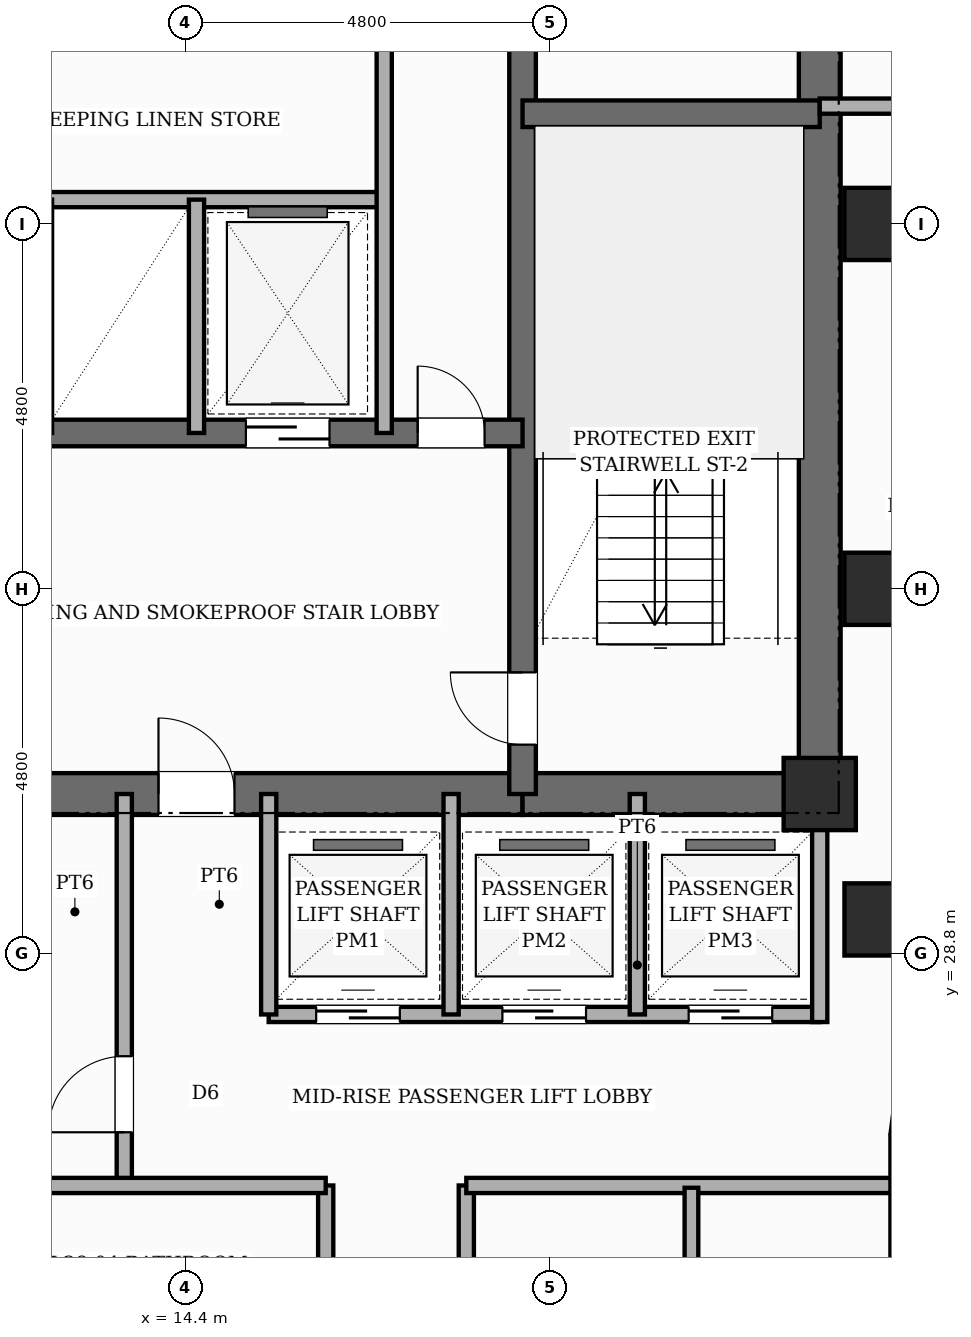
"""IFC4 building model, lengths in metres.
Left out: names, types, materials, properties, quantities, classifications, styles, units other than length and angle.
Written with IfcOpenShell. Run it as: python <this file> out.ifc"""

import sys

from ifc_helpers import new_model, si_unit, direction, frame, frame_2d, origin, origin_2d, place, context, subcontext, project, spatial, rectangle, extrude, element, fill, save


model = new_model("IFC4")
c1 = context("Model", 3, precision=1e-05, world=origin(), true_north=direction((0.0, 1.0)))
c2 = subcontext(c1, "Body", "Model", "MODEL_VIEW")
j1 = project(units=[si_unit("LENGTHUNIT", "METRE"), si_unit("PLANEANGLEUNIT", "RADIAN")], contexts=[c1])
p1 = place(None, origin())
s1 = spatial("IfcSite", under=j1, at=p1, CompositionType="ELEMENT")
p2 = place(p1, origin())
s2 = spatial("IfcBuilding", under=s1, at=p2, CompositionType="ELEMENT")
p3 = place(p2, frame((0.0, 0.0, 110.8)))
s3 = spatial("IfcBuildingStorey", under=s2, at=p3, CompositionType="ELEMENT", Elevation=110.8)
p4 = place(p3, frame((22.75, 30.625, 0.0), z_axis=(0.0, 0.0, 1.0), x_axis=(0.0, 1.0, 0.0)))
e1 = element("IfcWall", 1, at=p4, inside=s3, PredefinedType="SHEAR", context=c2, shape_type="SweptSolid", body=[
    extrude(rectangle(XDim=15.45, YDim=0.55, at=frame_2d((7.725, 0.0))), origin(), (0.0, 0.0, 1.0), 3.6),
])
p5 = place(p4, frame((10.725, 0.0, 0.0)))
e2 = element("IfcOpeningElement", 2, at=p5, cuts=e1, PredefinedType="OPENING", context=c2, shape_type="SweptSolid", body=[
    extrude(rectangle(XDim=1.0, YDim=2.15, at=frame_2d((0.5, 1.075))), frame((0.0, 0.285, 0.0), z_axis=(0.0, -1.0, 0.0), x_axis=(1.0, 0.0, 0.0)), (0.0, 0.0, 1.0), 0.57),
])
p6 = place(p3, frame((9.96, 30.9, 0.0), z_axis=(0.0, 0.0, 1.0), x_axis=(1.0, 0.0, 0.0)))
e3 = element("IfcWall", 3, at=p6, inside=s3, PredefinedType="SHEAR", context=c2, shape_type="SweptSolid", body=[
    extrude(rectangle(XDim=8.88, YDim=0.55, at=frame_2d((4.44, 0.0))), origin(), (0.0, 0.0, 1.0), 3.6),
])
p7 = place(p6, frame((4.09, 0.0, 0.0)))
e4 = element("IfcOpeningElement", 4, at=p7, cuts=e3, PredefinedType="OPENING", context=c2, shape_type="SweptSolid", body=[
    extrude(rectangle(XDim=1.0, YDim=2.15, at=frame_2d((0.5, 1.075))), frame((0.0, 0.285, 0.0), z_axis=(0.0, -1.0, 0.0), x_axis=(1.0, 0.0, 0.0)), (0.0, 0.0, 1.0), 0.57),
])
p8 = place(p3, frame((18.84, 30.9, 0.0), z_axis=(0.0, 0.0, 1.0), x_axis=(1.0, 0.0, 0.0)))
e5 = element("IfcWall", 5, at=p8, inside=s3, PredefinedType="SHEAR", context=c2, shape_type="SweptSolid", body=[
    extrude(rectangle(XDim=3.91, YDim=0.55, at=frame_2d((1.955, 0.0))), origin(), (0.0, 0.0, 1.0), 3.6),
])
p9 = place(p3, frame((18.84, 30.9, 0.0), z_axis=(0.0, 0.0, 1.0), x_axis=(0.0, 1.0, 0.0)))
e6 = element("IfcWall", 6, at=p9, inside=s3, PredefinedType="SHEAR", context=c2, shape_type="SweptSolid", body=[
    extrude(rectangle(XDim=14.9, YDim=0.35, at=frame_2d((7.45, 0.0))), origin(), (0.0, 0.0, 1.0), 3.6),
])
p10 = place(p9, frame((0.65, 0.0, 0.0)))
e7 = element("IfcOpeningElement", 7, at=p10, cuts=e6, PredefinedType="OPENING", context=c2, shape_type="SweptSolid", body=[
    extrude(rectangle(XDim=0.95, YDim=2.1, at=frame_2d((0.475, 1.05))), frame((0.0, 0.185, 0.0), z_axis=(0.0, -1.0, 0.0), x_axis=(1.0, 0.0, 0.0)), (0.0, 0.0, 1.0), 0.37),
])
p11 = place(p9, frame((10.45, 0.0, 0.0)))
e8 = element("IfcOpeningElement", 8, at=p11, cuts=e6, PredefinedType="OPENING", context=c2, shape_type="SweptSolid", body=[
    extrude(rectangle(XDim=1.0, YDim=2.15, at=frame_2d((0.5, 1.075))), frame((0.0, 0.185, 0.0), z_axis=(0.0, -1.0, 0.0), x_axis=(1.0, 0.0, 0.0)), (0.0, 0.0, 1.0), 0.37),
])
p12 = place(p3, frame((18.84, 39.85, 0.0), z_axis=(0.0, 0.0, 1.0), x_axis=(1.0, 0.0, 0.0)))
e9 = element("IfcWall", 9, at=p12, inside=s3, PredefinedType="SHEAR", context=c2, shape_type="SweptSolid", body=[
    extrude(rectangle(XDim=3.91, YDim=0.35, at=frame_2d((1.955, 0.0))), origin(), (0.0, 0.0, 1.0), 3.6),
])
p13 = place(p3, frame((9.96, 35.65, 0.0), z_axis=(0.0, 0.0, 1.0), x_axis=(1.0, 0.0, 0.0)))
e10 = element("IfcWall", 10, at=p13, inside=s3, PredefinedType="SHEAR", context=c2, shape_type="SweptSolid", body=[
    extrude(rectangle(XDim=8.88, YDim=0.35, at=frame_2d((4.44, 0.0))), origin(), (0.0, 0.0, 1.0), 3.6),
])
p14 = place(p13, frame((0.84, 0.0, 0.0)))
e11 = element("IfcOpeningElement", 11, at=p14, cuts=e10, PredefinedType="OPENING", context=c2, shape_type="SweptSolid", body=[
    extrude(rectangle(XDim=1.1, YDim=2.15, at=frame_2d((0.55, 1.075))), frame((0.0, 0.185, 0.0), z_axis=(0.0, -1.0, 0.0), x_axis=(1.0, 0.0, 0.0)), (0.0, 0.0, 1.0), 0.37),
])
p15 = place(p13, frame((5.24, 0.0, 0.0)))
e12 = element("IfcOpeningElement", 12, at=p15, cuts=e10, PredefinedType="OPENING", context=c2, shape_type="SweptSolid", body=[
    extrude(rectangle(XDim=1.1, YDim=2.15, at=frame_2d((0.55, 1.075))), frame((0.0, 0.185, 0.0), z_axis=(0.0, -1.0, 0.0), x_axis=(1.0, 0.0, 0.0)), (0.0, 0.0, 1.0), 0.37),
])
p16 = place(p13, frame((7.5, 0.0, 0.0)))
e13 = element("IfcOpeningElement", 13, at=p16, cuts=e10, PredefinedType="OPENING", context=c2, shape_type="SweptSolid", body=[
    extrude(rectangle(XDim=0.88, YDim=2.1, at=frame_2d((0.44, 1.05))), frame((0.0, 0.185, 0.0), z_axis=(0.0, -1.0, 0.0), x_axis=(1.0, 0.0, 0.0)), (0.0, 0.0, 1.0), 0.37),
])
for number, where, z_axis, x_axis in (
    (14, (22.75, 30.9, 0.0), (0.0, 0.0, 1.0), (1.0, 0.0, 0.0)),
    (15, (23.55, 29.25, 0.0), (0.0, 0.0, 1.0), (1.0, 0.0, 0.0)),
    (16, (23.55, 33.6, 0.0), (0.0, 0.0, 1.0), (1.0, 0.0, 0.0)),
    (17, (23.55, 38.4, 0.0), (0.0, 0.0, 1.0), (1.0, 0.0, 0.0)),
):
    element("IfcColumn", number, at=place(p3, frame(where, z_axis=z_axis, x_axis=x_axis)), inside=s3, PredefinedType="COLUMN", context=c2, shape_type="SweptSolid", body=[
        extrude(rectangle(XDim=0.95, YDim=0.95, at=origin_2d()), origin(), (0.0, 0.0, 1.0), 3.6),
    ])
p17 = place(p3, frame((23.923, 27.042, 0.0), z_axis=(0.0, 0.0, 1.0), x_axis=(-0.130555323746, -0.9914410257, 0.0)))
e18 = element("IfcWall", 18, at=p17, inside=s3, PredefinedType="STANDARD", context=c2, shape_type="SweptSolid", body=[
    extrude(rectangle(XDim=0.626, YDim=0.32, at=frame_2d((0.313, 0.0))), origin(), (0.0, 0.0, 1.0), 2.54),
])
p18 = place(p3, frame((23.84, 26.4, 0.0), z_axis=(0.0, 0.0, 1.0), x_axis=(0.0, -1.0, 0.0)))
e19 = element("IfcWall", 19, at=p18, inside=s3, PredefinedType="STANDARD", context=c2, shape_type="SweptSolid", body=[
    extrude(rectangle(XDim=14.4, YDim=0.32, at=frame_2d((7.2, 0.0))), origin(), (0.0, 0.0, 1.0), 2.54),
])
p19 = place(p18, frame((9.354, 0.0, 0.65)))
e20 = element("IfcOpeningElement", 20, at=p19, cuts=e19, PredefinedType="OPENING", context=c2, shape_type="SweptSolid", body=[
    extrude(rectangle(XDim=1.4, YDim=1.1, at=frame_2d((0.7, 0.55))), frame((0.0, 0.17, 0.0), z_axis=(0.0, -1.0, 0.0), x_axis=(1.0, 0.0, 0.0)), (0.0, 0.0, 1.0), 0.34),
])
p20 = place(p18, frame((3.954, 0.0, 0.65)))
e21 = element("IfcOpeningElement", 21, at=p20, cuts=e19, PredefinedType="OPENING", context=c2, shape_type="SweptSolid", body=[
    extrude(rectangle(XDim=1.4, YDim=1.1, at=frame_2d((0.7, 0.55))), frame((0.0, 0.17, 0.0), z_axis=(0.0, -1.0, 0.0), x_axis=(1.0, 0.0, 0.0)), (0.0, 0.0, 1.0), 0.34),
])
p21 = place(p18, frame((12.707, 0.0, 0.45)))
e22 = element("IfcOpeningElement", 22, at=p21, cuts=e19, PredefinedType="OPENING", context=c2, shape_type="SweptSolid", body=[
    extrude(rectangle(XDim=0.95, YDim=1.8, at=frame_2d((0.475, 0.9))), frame((0.0, 0.17, 0.0), z_axis=(0.0, -1.0, 0.0), x_axis=(1.0, 0.0, 0.0)), (0.0, 0.0, 1.0), 0.34),
])
p22 = place(p18, frame((7.902, 0.0, 0.45)))
e23 = element("IfcOpeningElement", 23, at=p22, cuts=e19, PredefinedType="OPENING", context=c2, shape_type="SweptSolid", body=[
    extrude(rectangle(XDim=0.6, YDim=1.8, at=frame_2d((0.3, 0.9))), frame((0.0, 0.17, 0.0), z_axis=(0.0, -1.0, 0.0), x_axis=(1.0, 0.0, 0.0)), (0.0, 0.0, 1.0), 0.34),
])
p23 = place(p18, frame((0.917, 0.0, 0.45)))
e24 = element("IfcOpeningElement", 24, at=p23, cuts=e19, PredefinedType="OPENING", context=c2, shape_type="SweptSolid", body=[
    extrude(rectangle(XDim=0.75, YDim=1.8, at=frame_2d((0.375, 0.9))), frame((0.0, 0.17, 0.0), z_axis=(0.0, -1.0, 0.0), x_axis=(1.0, 0.0, 0.0)), (0.0, 0.0, 1.0), 0.34),
])
p24 = place(p3, frame((9.96, 38.72, 0.0), z_axis=(0.0, 0.0, 1.0), x_axis=(1.0, 0.0, 0.0)))
e25 = element("IfcWall", 25, at=p24, inside=s3, PredefinedType="POLYGONAL", context=c2, shape_type="SweptSolid", body=[
    extrude(rectangle(XDim=7.06, YDim=0.2, at=frame_2d((3.53, 0.0))), origin(), (0.0, 0.0, 1.0), 3.36),
])
p25 = place(p3, frame((14.55, 35.65, 0.0), z_axis=(0.0, 0.0, 1.0), x_axis=(0.0, 1.0, 0.0)))
e26 = element("IfcWall", 26, at=p25, inside=s3, PredefinedType="POLYGONAL", context=c2, shape_type="SweptSolid", body=[
    extrude(rectangle(XDim=3.07, YDim=0.2, at=frame_2d((1.535, 0.0))), origin(), (0.0, 0.0, 1.0), 3.36),
])
p26 = place(p3, frame((17.02, 35.65, 0.0), z_axis=(0.0, 0.0, 1.0), x_axis=(0.0, 1.0, 0.0)))
e27 = element("IfcWall", 27, at=p26, inside=s3, PredefinedType="POLYGONAL", context=c2, shape_type="SweptSolid", body=[
    extrude(rectangle(XDim=5.15, YDim=0.2, at=frame_2d((2.575, 0.0))), origin(), (0.0, 0.0, 1.0), 3.36),
])
p27 = place(p3, frame((13.6, 25.75, 0.0), z_axis=(0.0, 0.0, 1.0), x_axis=(0.0, 1.0, 0.0)))
e28 = element("IfcWall", 28, at=p27, inside=s3, PredefinedType="POLYGONAL", context=c2, shape_type="SweptSolid", body=[
    extrude(rectangle(XDim=5.15, YDim=0.2, at=frame_2d((2.575, 0.0))), origin(), (0.0, 0.0, 1.0), 3.36),
])
p28 = place(p27, frame((0.7, 0.0, 0.0)))
e29 = element("IfcOpeningElement", 29, at=p28, cuts=e28, PredefinedType="OPENING", context=c2, shape_type="SweptSolid", body=[
    extrude(rectangle(XDim=1.0, YDim=2.15, at=frame_2d((0.5, 1.075))), frame((0.0, 0.11, 0.0), z_axis=(0.0, -1.0, 0.0), x_axis=(1.0, 0.0, 0.0)), (0.0, 0.0, 1.0), 0.22),
])
p29 = place(p3, frame((15.5, 28.0, 0.0), z_axis=(0.0, 0.0, 1.0), x_axis=(1.0, 0.0, 0.0)))
e30 = element("IfcWall", 30, at=p29, inside=s3, PredefinedType="POLYGONAL", context=c2, shape_type="SweptSolid", body=[
    extrude(rectangle(XDim=7.25, YDim=0.2, at=frame_2d((3.625, 0.0))), origin(), (0.0, 0.0, 1.0), 3.36),
])
p30 = place(p29, frame((0.625, 0.0, 0.0)))
e31 = element("IfcOpeningElement", 31, at=p30, cuts=e30, PredefinedType="OPENING", context=c2, shape_type="SweptSolid", body=[
    extrude(rectangle(XDim=1.1, YDim=2.15, at=frame_2d((0.55, 1.075))), frame((0.0, 0.11, 0.0), z_axis=(0.0, -1.0, 0.0), x_axis=(1.0, 0.0, 0.0)), (0.0, 0.0, 1.0), 0.22),
])
p31 = place(p29, frame((3.075, 0.0, 0.0)))
e32 = element("IfcOpeningElement", 32, at=p31, cuts=e30, PredefinedType="OPENING", context=c2, shape_type="SweptSolid", body=[
    extrude(rectangle(XDim=1.1, YDim=2.15, at=frame_2d((0.55, 1.075))), frame((0.0, 0.11, 0.0), z_axis=(0.0, -1.0, 0.0), x_axis=(1.0, 0.0, 0.0)), (0.0, 0.0, 1.0), 0.22),
])
p32 = place(p29, frame((5.525, 0.0, 0.0)))
e33 = element("IfcOpeningElement", 33, at=p32, cuts=e30, PredefinedType="OPENING", context=c2, shape_type="SweptSolid", body=[
    extrude(rectangle(XDim=1.1, YDim=2.15, at=frame_2d((0.55, 1.075))), frame((0.0, 0.11, 0.0), z_axis=(0.0, -1.0, 0.0), x_axis=(1.0, 0.0, 0.0)), (0.0, 0.0, 1.0), 0.22),
])
p33 = place(p3, frame((15.5, 28.0, 0.0), z_axis=(0.0, 0.0, 1.0), x_axis=(0.0, 1.0, 0.0)))
e34 = element("IfcWall", 34, at=p33, inside=s3, PredefinedType="POLYGONAL", context=c2, shape_type="SweptSolid", body=[
    extrude(rectangle(XDim=2.9, YDim=0.2, at=frame_2d((1.45, 0.0))), origin(), (0.0, 0.0, 1.0), 3.36),
])
p34 = place(p3, frame((22.75, 27.9, 0.0), z_axis=(0.0, 0.0, 1.0), x_axis=(0.0, 1.0, 0.0)))
e35 = element("IfcWall", 35, at=p34, inside=s3, PredefinedType="POLYGONAL", context=c2, shape_type="SweptSolid", body=[
    extrude(rectangle(XDim=3.0, YDim=0.2, at=frame_2d((1.5, 0.0))), origin(), (0.0, 0.0, 1.0), 3.36),
])
for number, where, z_axis, x_axis in (
    (36, (17.9, 28.0, 0.0), (0.0, 0.0, 1.0), (0.0, 1.0, 0.0)),
    (37, (20.35, 28.0, 0.0), (0.0, 0.0, 1.0), (0.0, 1.0, 0.0)),
):
    element("IfcWall", number, at=place(p3, frame(where, z_axis=z_axis, x_axis=x_axis)), inside=s3, PredefinedType="POLYGONAL", context=c2, shape_type="SweptSolid", body=[
        extrude(rectangle(XDim=2.9, YDim=0.2, at=frame_2d((1.45, 0.0))), origin(), (0.0, 0.0, 1.0), 3.36),
    ])
p35 = place(p3, frame((16.25, 9.92, 0.0), z_axis=(0.0, 0.0, 1.0), x_axis=(0.0, 1.0, 0.0)))
e38 = element("IfcWall", 38, at=p35, inside=s3, PredefinedType="PARTITIONING", context=c2, shape_type="SweptSolid", body=[
    extrude(rectangle(XDim=15.83, YDim=0.2, at=frame_2d((7.915, 0.0))), origin(), (0.0, 0.0, 1.0), 3.36),
])
p36 = place(p35, frame((0.835, 0.0, 0.0)))
e39 = element("IfcOpeningElement", 39, at=p36, cuts=e38, PredefinedType="OPENING", context=c2, shape_type="SweptSolid", body=[
    extrude(rectangle(XDim=0.98, YDim=2.18, at=frame_2d((0.49, 1.09))), frame((0.0, 0.11, 0.0), z_axis=(0.0, -1.0, 0.0), x_axis=(1.0, 0.0, 0.0)), (0.0, 0.0, 1.0), 0.22),
])
p37 = place(p35, frame((4.415, 0.0, 0.0)))
e40 = element("IfcOpeningElement", 40, at=p37, cuts=e38, PredefinedType="OPENING", context=c2, shape_type="SweptSolid", body=[
    extrude(rectangle(XDim=0.98, YDim=2.18, at=frame_2d((0.49, 1.09))), frame((0.0, 0.11, 0.0), z_axis=(0.0, -1.0, 0.0), x_axis=(1.0, 0.0, 0.0)), (0.0, 0.0, 1.0), 0.22),
])
p38 = place(p35, frame((8.415, 0.0, 0.0)))
e41 = element("IfcOpeningElement", 41, at=p38, cuts=e38, PredefinedType="OPENING", context=c2, shape_type="SweptSolid", body=[
    extrude(rectangle(XDim=0.98, YDim=2.18, at=frame_2d((0.49, 1.09))), frame((0.0, 0.11, 0.0), z_axis=(0.0, -1.0, 0.0), x_axis=(1.0, 0.0, 0.0)), (0.0, 0.0, 1.0), 0.22),
])
p39 = place(p35, frame((12.28, 0.0, 0.0)))
e42 = element("IfcOpeningElement", 42, at=p39, cuts=e38, PredefinedType="OPENING", context=c2, shape_type="SweptSolid", body=[
    extrude(rectangle(XDim=0.98, YDim=2.18, at=frame_2d((0.49, 1.09))), frame((0.0, 0.11, 0.0), z_axis=(0.0, -1.0, 0.0), x_axis=(1.0, 0.0, 0.0)), (0.0, 0.0, 1.0), 0.22),
])
p40 = place(p3, frame((18.1, 9.92, 0.0), z_axis=(0.0, 0.0, 1.0), x_axis=(0.0, 1.0, 0.0)))
e43 = element("IfcWall", 43, at=p40, inside=s3, PredefinedType="PARTITIONING", context=c2, shape_type="SweptSolid", body=[
    extrude(rectangle(XDim=15.83, YDim=0.2, at=frame_2d((7.915, 0.0))), origin(), (0.0, 0.0, 1.0), 3.36),
])
p41 = place(p40, frame((0.946, 0.0, 0.0)))
e44 = element("IfcOpeningElement", 44, at=p41, cuts=e43, PredefinedType="OPENING", context=c2, shape_type="SweptSolid", body=[
    extrude(rectangle(XDim=0.98, YDim=2.18, at=frame_2d((0.49, 1.09))), frame((0.0, 0.11, 0.0), z_axis=(0.0, -1.0, 0.0), x_axis=(1.0, 0.0, 0.0)), (0.0, 0.0, 1.0), 0.22),
])
p42 = place(p40, frame((5.956, 0.0, 0.0)))
e45 = element("IfcOpeningElement", 45, at=p42, cuts=e43, PredefinedType="OPENING", context=c2, shape_type="SweptSolid", body=[
    extrude(rectangle(XDim=0.98, YDim=2.18, at=frame_2d((0.49, 1.09))), frame((0.0, 0.11, 0.0), z_axis=(0.0, -1.0, 0.0), x_axis=(1.0, 0.0, 0.0)), (0.0, 0.0, 1.0), 0.22),
])
p43 = place(p40, frame((11.356, 0.0, 0.0)))
e46 = element("IfcOpeningElement", 46, at=p43, cuts=e43, PredefinedType="OPENING", context=c2, shape_type="SweptSolid", body=[
    extrude(rectangle(XDim=0.98, YDim=2.18, at=frame_2d((0.49, 1.09))), frame((0.0, 0.11, 0.0), z_axis=(0.0, -1.0, 0.0), x_axis=(1.0, 0.0, 0.0)), (0.0, 0.0, 1.0), 0.22),
])
p44 = place(p3, frame((5.12, 25.75, 0.0), z_axis=(0.0, 0.0, 1.0), x_axis=(1.0, 0.0, 0.0)))
e47 = element("IfcWall", 47, at=p44, inside=s3, PredefinedType="PARTITIONING", context=c2, shape_type="SweptSolid", body=[
    extrude(rectangle(XDim=11.13, YDim=0.2, at=frame_2d((5.565, 0.0))), origin(), (0.0, 0.0, 1.0), 3.36),
])
p45 = place(p3, frame((18.1, 25.75, 0.0), z_axis=(0.0, 0.0, 1.0), x_axis=(1.0, 0.0, 0.0)))
e48 = element("IfcWall", 48, at=p45, inside=s3, PredefinedType="PARTITIONING", context=c2, shape_type="SweptSolid", body=[
    extrude(rectangle(XDim=5.58, YDim=0.2, at=frame_2d((2.79, 0.0))), origin(), (0.0, 0.0, 1.0), 3.36),
])
p46 = place(p3, frame((21.062, 23.092, 0.0), z_axis=(0.0, 0.0, 1.0), x_axis=(0.0, 1.0, 0.0)))
e49 = element("IfcWall", 49, at=p46, inside=s3, PredefinedType="PLUMBINGWALL", context=c2, shape_type="SweptSolid", body=[
    extrude(rectangle(XDim=2.628, YDim=0.18, at=frame_2d((1.314, 0.0))), origin(), (0.0, 0.0, 1.0), 3.36),
])
p47 = place(p3, frame((22.75, 39.95, 0.0), z_axis=(0.0, 0.0, 1.0), x_axis=(1.0, 0.0, 0.0)))
e50 = element("IfcWall", 50, at=p47, inside=s3, PredefinedType="PARTITIONING", context=c2, shape_type="SweptSolid", body=[
    extrude(rectangle(XDim=2.75, YDim=0.2, at=frame_2d((1.375, 0.0))), origin(), (0.0, 0.0, 1.0), 3.36),
])
p48 = place(p10, origin())
e51 = element("IfcDoor", 51, at=p48, inside=s3, OperationType="SINGLE_SWING_RIGHT", PredefinedType="DOOR", context=c2, shape_type="SweptSolid", body=[
    extrude(rectangle(XDim=0.95, YDim=2.1, at=frame_2d((0.475, 1.05))), frame((0.0, 0.025, 0.0), z_axis=(0.0, -1.0, 0.0), x_axis=(1.0, 0.0, 0.0)), (0.0, 0.0, 1.0), 0.05),
])
fill(e7, e51)
p49 = place(p7, origin())
e52 = element("IfcDoor", 52, at=p49, inside=s3, OperationType="SINGLE_SWING_LEFT", PredefinedType="DOOR", context=c2, shape_type="SweptSolid", body=[
    extrude(rectangle(XDim=1.0, YDim=2.15, at=frame_2d((0.5, 1.075))), frame((0.0, 0.025, 0.0), z_axis=(0.0, -1.0, 0.0), x_axis=(1.0, 0.0, 0.0)), (0.0, 0.0, 1.0), 0.05),
])
fill(e4, e52)
p50 = place(p15, origin())
e53 = element("IfcDoor", 53, at=p50, inside=s3, OperationType="SLIDING_TO_RIGHT", PredefinedType="DOOR", context=c2, shape_type="SweptSolid", body=[
    extrude(rectangle(XDim=1.1, YDim=2.15, at=frame_2d((0.55, 1.075))), frame((0.0, 0.025, 0.0), z_axis=(0.0, -1.0, 0.0), x_axis=(1.0, 0.0, 0.0)), (0.0, 0.0, 1.0), 0.05),
])
fill(e12, e53)
p51 = place(p16, origin())
e54 = element("IfcDoor", 54, at=p51, inside=s3, OperationType="SINGLE_SWING_LEFT", PredefinedType="DOOR", context=c2, shape_type="SweptSolid", body=[
    extrude(rectangle(XDim=0.88, YDim=2.1, at=frame_2d((0.44, 1.05))), frame((0.0, 0.025, 0.0), z_axis=(0.0, -1.0, 0.0), x_axis=(1.0, 0.0, 0.0)), (0.0, 0.0, 1.0), 0.05),
])
fill(e13, e54)
p52 = place(p28, origin())
e55 = element("IfcDoor", 55, at=p52, inside=s3, OperationType="SINGLE_SWING_LEFT", PredefinedType="DOOR", context=c2, shape_type="SweptSolid", body=[
    extrude(rectangle(XDim=1.0, YDim=2.15, at=frame_2d((0.5, 1.075))), frame((0.0, 0.025, 0.0), z_axis=(0.0, -1.0, 0.0), x_axis=(1.0, 0.0, 0.0)), (0.0, 0.0, 1.0), 0.05),
])
fill(e29, e55)
p53 = place(p30, origin())
e56 = element("IfcDoor", 56, at=p53, inside=s3, OperationType="SLIDING_TO_LEFT", PredefinedType="DOOR", context=c2, shape_type="SweptSolid", body=[
    extrude(rectangle(XDim=1.1, YDim=2.15, at=frame_2d((0.55, 1.075))), frame((0.0, 0.025, 0.0), z_axis=(0.0, -1.0, 0.0), x_axis=(1.0, 0.0, 0.0)), (0.0, 0.0, 1.0), 0.05),
])
fill(e31, e56)
p54 = place(p31, origin())
e57 = element("IfcDoor", 57, at=p54, inside=s3, OperationType="SLIDING_TO_RIGHT", PredefinedType="DOOR", context=c2, shape_type="SweptSolid", body=[
    extrude(rectangle(XDim=1.1, YDim=2.15, at=frame_2d((0.55, 1.075))), frame((0.0, 0.025, 0.0), z_axis=(0.0, -1.0, 0.0), x_axis=(1.0, 0.0, 0.0)), (0.0, 0.0, 1.0), 0.05),
])
fill(e32, e57)
p55 = place(p32, origin())
e58 = element("IfcDoor", 58, at=p55, inside=s3, OperationType="SLIDING_TO_LEFT", PredefinedType="DOOR", context=c2, shape_type="SweptSolid", body=[
    extrude(rectangle(XDim=1.1, YDim=2.15, at=frame_2d((0.55, 1.075))), frame((0.0, 0.025, 0.0), z_axis=(0.0, -1.0, 0.0), x_axis=(1.0, 0.0, 0.0)), (0.0, 0.0, 1.0), 0.05),
])
fill(e33, e58)
save(model, sys.argv[1])
